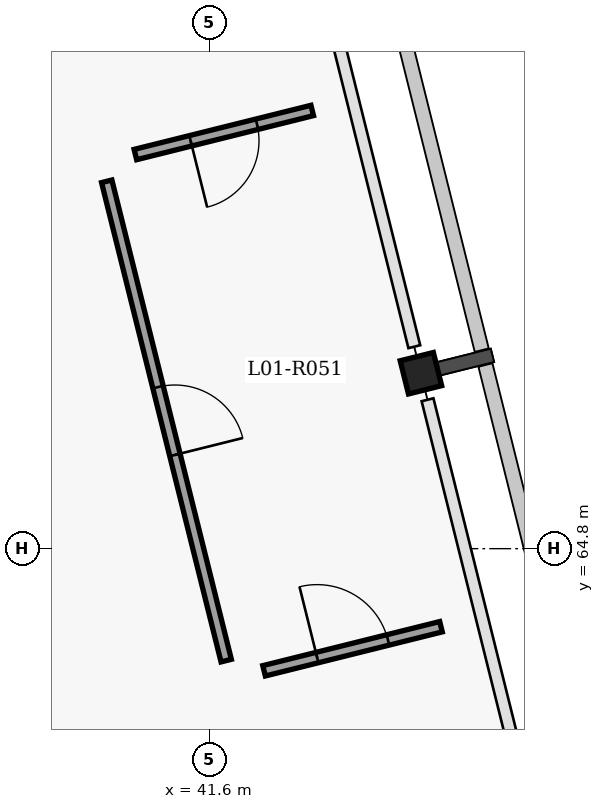
"""IFC4 building model, lengths in metres.
Left out: names, types, materials, properties, quantities, classifications, styles, units other than length and angle.
Written with IfcOpenShell. Run it as: python <this file> out.ifc"""

import sys

from ifc_helpers import new_model, si_unit, direction, frame, frame_2d, origin, origin_2d, place, context, subcontext, project, spatial, rectangle, extrude, element, fill, save


model = new_model("IFC4")
c1 = context("Model", 3, precision=1e-05, world=origin(), true_north=direction((0.0, 1.0)))
c2 = subcontext(c1, "Body", "Model", "MODEL_VIEW")
j1 = project(units=[si_unit("LENGTHUNIT", "METRE"), si_unit("PLANEANGLEUNIT", "RADIAN")], contexts=[c1])
p1 = place(None, origin())
s1 = spatial("IfcSite", under=j1, at=p1, CompositionType="ELEMENT")
p2 = place(p1, origin())
s2 = spatial("IfcBuilding", under=s1, at=p2, CompositionType="ELEMENT")
p3 = place(p2, frame((0.0, 0.0, 4.8)))
s3 = spatial("IfcBuildingStorey", under=s2, at=p3, CompositionType="ELEMENT", Elevation=4.8)
p4 = place(p3, frame((44.381, 67.108, 0.0), z_axis=(0.0, 0.0, 1.0), x_axis=(0.970295726276, 0.2419218956, 0.0)))
e1 = element("IfcColumn", 1, at=p4, inside=s3, PredefinedType="COLUMN", context=c2, shape_type="SweptSolid", body=[
    extrude(rectangle(XDim=0.45, YDim=0.45, at=origin_2d()), origin(), (0.0, 0.0, 1.0), 4.2),
])
p5 = place(p3, frame((41.819, 63.327, 0.0), z_axis=(0.0, 0.0, 1.0), x_axis=(-0.241881495727, 0.970305798202, 0.0)))
e2 = element("IfcWall", 2, at=p5, inside=s3, PredefinedType="PARTITIONING", context=c2, shape_type="SweptSolid", body=[
    extrude(rectangle(XDim=6.499, YDim=0.14, at=frame_2d((3.25, 0.0))), origin(), (0.0, 0.0, 1.0), 3.485),
])
p6 = place(p5, frame((2.789, 0.0, 0.0)))
e3 = element("IfcOpeningElement", 3, at=p6, cuts=e2, PredefinedType="OPENING", context=c2, shape_type="SweptSolid", body=[
    extrude(rectangle(XDim=0.92, YDim=2.1, at=frame_2d((0.46, 1.05))), frame((0.0, 0.08, 0.0), z_axis=(0.0, -1.0, 0.0), x_axis=(1.0, 0.0, 0.0)), (0.0, 0.0, 1.0), 0.16),
])
p7 = place(p3, frame((42.317, 63.193, 0.0), z_axis=(0.0, 0.0, 1.0), x_axis=(0.970357603284, 0.24167358513, 0.0)))
e4 = element("IfcWall", 4, at=p7, inside=s3, PredefinedType="PARTITIONING", context=c2, shape_type="SweptSolid", body=[
    extrude(rectangle(XDim=2.399, YDim=0.14, at=frame_2d((1.2, 0.0))), origin(), (0.0, 0.0, 1.0), 3.587),
])
p8 = place(p7, frame((0.72, 0.0, 0.0)))
e5 = element("IfcOpeningElement", 5, at=p8, cuts=e4, PredefinedType="OPENING", context=c2, shape_type="SweptSolid", body=[
    extrude(rectangle(XDim=0.96, YDim=2.08, at=frame_2d((0.48, 1.04))), frame((0.0, 0.08, 0.0), z_axis=(0.0, -1.0, 0.0), x_axis=(1.0, 0.0, 0.0)), (0.0, 0.0, 1.0), 0.16),
])
p9 = place(p3, frame((40.624, 69.985, 0.0), z_axis=(0.0, 0.0, 1.0), x_axis=(0.970327865017, 0.241792957656, 0.0)))
e6 = element("IfcWall", 6, at=p9, inside=s3, PredefinedType="PARTITIONING", context=c2, shape_type="SweptSolid", body=[
    extrude(rectangle(XDim=2.398, YDim=0.14, at=frame_2d((1.199, 0.0))), origin(), (0.0, 0.0, 1.0), 3.587),
])
p10 = place(p9, frame((0.749, 0.0, 0.0)))
e7 = element("IfcOpeningElement", 7, at=p10, cuts=e6, PredefinedType="OPENING", context=c2, shape_type="SweptSolid", body=[
    extrude(rectangle(XDim=0.9, YDim=2.06, at=frame_2d((0.45, 1.03))), frame((0.0, 0.08, 0.0), z_axis=(0.0, -1.0, 0.0), x_axis=(1.0, 0.0, 0.0)), (0.0, 0.0, 1.0), 0.16),
])
p11 = place(p6, origin())
e8 = element("IfcDoor", 8, at=p11, inside=s3, OperationType="SINGLE_SWING_RIGHT", PredefinedType="DOOR", context=c2, shape_type="SweptSolid", body=[
    extrude(rectangle(XDim=0.92, YDim=2.1, at=frame_2d((0.46, 1.05))), frame((0.0, 0.025, 0.0), z_axis=(0.0, -1.0, 0.0), x_axis=(1.0, 0.0, 0.0)), (0.0, 0.0, 1.0), 0.05),
])
fill(e3, e8)
p12 = place(p8, origin())
e9 = element("IfcDoor", 9, at=p12, inside=s3, OperationType="SINGLE_SWING_LEFT", PredefinedType="DOOR", context=c2, shape_type="SweptSolid", body=[
    extrude(rectangle(XDim=0.96, YDim=2.08, at=frame_2d((0.48, 1.04))), frame((0.0, 0.025, 0.0), z_axis=(0.0, -1.0, 0.0), x_axis=(1.0, 0.0, 0.0)), (0.0, 0.0, 1.0), 0.05),
])
fill(e5, e9)
p13 = place(p10, origin())
e10 = element("IfcDoor", 10, at=p13, inside=s3, OperationType="SINGLE_SWING_RIGHT", PredefinedType="DOOR", context=c2, shape_type="SweptSolid", body=[
    extrude(rectangle(XDim=0.9, YDim=2.06, at=frame_2d((0.45, 1.03))), frame((0.0, 0.025, 0.0), z_axis=(0.0, -1.0, 0.0), x_axis=(1.0, 0.0, 0.0)), (0.0, 0.0, 1.0), 0.05),
])
fill(e7, e10)
save(model, sys.argv[1])
